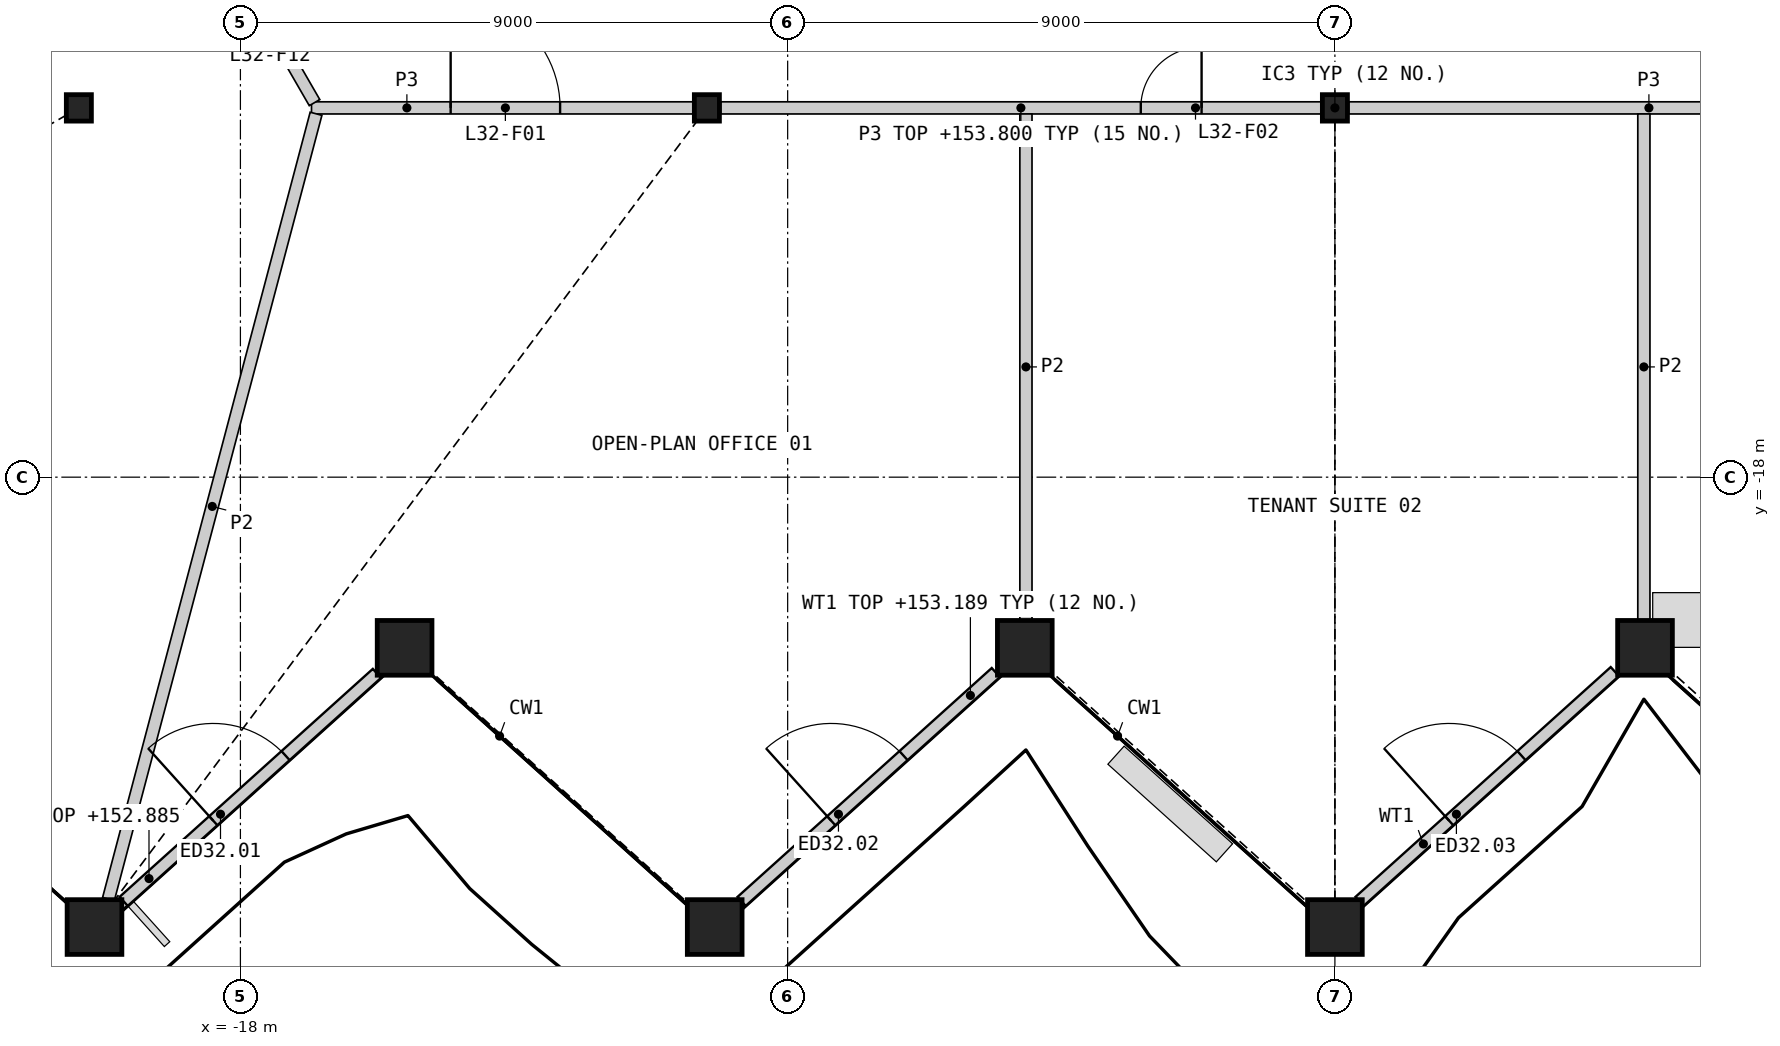
"""IFC4 building model, lengths in metres.
Left out: names, types, materials, properties, quantities, classifications, styles, units other than length and angle.
Written with IfcOpenShell. Run it as: python <this file> out.ifc"""

import sys

from ifc_helpers import new_model, si_unit, direction, frame, frame_2d, origin, origin_2d, place, context, subcontext, project, spatial, rectangle, hollow_rectangle, i_section, extrude, element, fill, save


model = new_model("IFC4")
c1 = context("Model", 3, precision=1e-05, world=origin(), true_north=direction((0.0, 1.0)))
c2 = subcontext(c1, "Body", "Model", "MODEL_VIEW")
j1 = project(units=[si_unit("LENGTHUNIT", "METRE"), si_unit("PLANEANGLEUNIT", "RADIAN")], contexts=[c1])
p1 = place(None, origin())
s1 = spatial("IfcSite", under=j1, at=p1, CompositionType="ELEMENT")
p2 = place(p1, origin())
s2 = spatial("IfcBuilding", under=s1, at=p2, CompositionType="ELEMENT")
p3 = place(p2, frame((0.0, 0.0, 150.0)))
s3 = spatial("IfcBuildingStorey", under=s2, at=p3, CompositionType="ELEMENT", Elevation=150.0)
for number, where, z_axis, x_axis in (
    (1, (-20.4, -25.399, 0.0), (0.0, 0.0, 1.0), (1.0, 0.0, 0.0)),
    (2, (-15.3, -20.807, 0.0), (0.0, 0.0, 1.0), (1.0, 0.0, 0.0)),
    (3, (-10.2, -25.399, 0.0), (0.0, 0.0, 1.0), (1.0, 0.0, 0.0)),
    (4, (-5.1, -20.807, 0.0), (0.0, 0.0, 1.0), (1.0, 0.0, 0.0)),
    (5, (0.0, -25.399, 0.0), (0.0, 0.0, 1.0), (1.0, 0.0, 0.0)),
    (6, (5.1, -20.807, 0.0), (0.0, 0.0, 1.0), (1.0, 0.0, 0.0)),
):
    element("IfcColumn", number, at=place(p3, frame(where, z_axis=z_axis, x_axis=x_axis)), inside=s3, PredefinedType="COLUMN", context=c2, shape_type="SweptSolid", body=[
        extrude(hollow_rectangle(XDim=0.9, YDim=0.9, WallThickness=0.06, at=origin_2d()), origin(), (0.0, 0.0, 1.0), 4.2),
    ])
for number, where, z_axis, x_axis in (
    (7, (-20.657, -11.926, 0.0), (0.0, 0.0, 1.0), (1.0, 0.0, 0.0)),
    (8, (-10.328, -11.926, 0.0), (0.0, 0.0, 1.0), (1.0, 0.0, 0.0)),
    (9, (0.0, -11.926, 0.0), (0.0, 0.0, 1.0), (1.0, 0.0, 0.0)),
):
    element("IfcColumn", number, at=place(p3, frame(where, z_axis=z_axis, x_axis=x_axis)), inside=s3, PredefinedType="COLUMN", context=c2, shape_type="SweptSolid", body=[
        extrude(i_section(OverallWidth=0.412, OverallDepth=0.435, WebThickness=0.036, FlangeThickness=0.057, at=origin_2d()), origin(), (0.0, 0.0, 1.0), 4.2),
    ])
p4 = place(p3, frame((-19.92, -24.977, 0.0), z_axis=(0.0, 0.0, 1.0), x_axis=(0.743146822591, 0.669128388333, 0.0)))
e10 = element("IfcWall", 10, at=p4, inside=s3, PredefinedType="SOLIDWALL", context=c2, shape_type="SweptSolid", body=[
    extrude(rectangle(XDim=5.604, YDim=0.2, at=frame_2d((2.802, 0.0))), origin(), (0.0, 0.0, 1.0), 2.885),
])
p5 = place(p4, frame((1.983, 0.0, 0.0)))
e11 = element("IfcOpeningElement", 11, at=p5, cuts=e10, PredefinedType="OPENING", context=c2, shape_type="SweptSolid", body=[
    extrude(rectangle(XDim=1.6, YDim=2.4, at=frame_2d((0.8, 1.2))), frame((0.0, 0.11, 0.0), z_axis=(0.0, -1.0, 0.0), x_axis=(1.0, 0.0, 0.0)), (0.0, 0.0, 1.0), 0.22),
])
p6 = place(p3, frame((-9.757, -24.977, 0.0), z_axis=(0.0, 0.0, 1.0), x_axis=(0.743158172546, 0.66911578264, 0.0)))
e12 = element("IfcWall", 12, at=p6, inside=s3, PredefinedType="SOLIDWALL", context=c2, shape_type="SweptSolid", body=[
    extrude(rectangle(XDim=5.625, YDim=0.2, at=frame_2d((2.812, 0.0))), origin(), (0.0, 0.0, 1.0), 3.189),
])
p7 = place(p6, frame((1.983, 0.0, 0.0)))
e13 = element("IfcOpeningElement", 13, at=p7, cuts=e12, PredefinedType="OPENING", context=c2, shape_type="SweptSolid", body=[
    extrude(rectangle(XDim=1.6, YDim=2.4, at=frame_2d((0.8, 1.2))), frame((0.0, 0.11, 0.0), z_axis=(0.0, -1.0, 0.0), x_axis=(1.0, 0.0, 0.0)), (0.0, 0.0, 1.0), 0.22),
])
p8 = place(p3, frame((0.406, -24.977, 0.0), z_axis=(0.0, 0.0, 1.0), x_axis=(0.743158726114, 0.669115167815, 0.0)))
e14 = element("IfcWall", 14, at=p8, inside=s3, PredefinedType="SOLIDWALL", context=c2, shape_type="SweptSolid", body=[
    extrude(rectangle(XDim=5.648, YDim=0.2, at=frame_2d((2.824, 0.0))), origin(), (0.0, 0.0, 1.0), 3.189),
])
p9 = place(p8, frame((1.983, 0.0, 0.0)))
e15 = element("IfcOpeningElement", 15, at=p9, cuts=e14, PredefinedType="OPENING", context=c2, shape_type="SweptSolid", body=[
    extrude(rectangle(XDim=1.6, YDim=2.4, at=frame_2d((0.8, 1.2))), frame((0.0, 0.11, 0.0), z_axis=(0.0, -1.0, 0.0), x_axis=(1.0, 0.0, 0.0)), (0.0, 0.0, 1.0), 0.22),
])
p10 = place(p3, frame((-10.101, -11.926, 0.0), z_axis=(0.0, 0.0, 1.0), x_axis=(1.0, 0.0, 0.0)))
e16 = element("IfcWall", 16, at=p10, inside=s3, PredefinedType="PARTITIONING", context=c2, shape_type="SweptSolid", body=[
    extrude(rectangle(XDim=9.874, YDim=0.2, at=frame_2d((4.937, 0.0))), origin(), (0.0, 0.0, 1.0), 3.8),
])
p11 = place(p10, frame((6.909, 0.0, 0.0)))
e17 = element("IfcOpeningElement", 17, at=p11, cuts=e16, PredefinedType="OPENING", context=c2, shape_type="SweptSolid", body=[
    extrude(rectangle(XDim=1.0, YDim=2.1, at=frame_2d((0.5, 1.05))), frame((0.0, 0.11, 0.0), z_axis=(0.0, -1.0, 0.0), x_axis=(1.0, 0.0, 0.0)), (0.0, 0.0, 1.0), 0.22),
])
p12 = place(p3, frame((0.227, -11.926, 0.0), z_axis=(0.0, 0.0, 1.0), x_axis=(1.0, 0.0, 0.0)))
e18 = element("IfcWall", 18, at=p12, inside=s3, PredefinedType="PARTITIONING", context=c2, shape_type="SweptSolid", body=[
    extrude(rectangle(XDim=9.874, YDim=0.2, at=frame_2d((4.937, 0.0))), origin(), (0.0, 0.0, 1.0), 3.8),
])
p13 = place(p3, frame((-16.831, -11.926, 0.0), z_axis=(0.0, 0.0, 1.0), x_axis=(1.0, 0.0, 0.0)))
e19 = element("IfcWall", 19, at=p13, inside=s3, PredefinedType="PARTITIONING", context=c2, shape_type="SweptSolid", body=[
    extrude(rectangle(XDim=6.275, YDim=0.2, at=frame_2d((3.137, 0.0))), origin(), (0.0, 0.0, 1.0), 3.8),
])
p14 = place(p13, frame((2.289, 0.0, 0.0)))
e20 = element("IfcOpeningElement", 20, at=p14, cuts=e19, PredefinedType="OPENING", context=c2, shape_type="SweptSolid", body=[
    extrude(rectangle(XDim=1.8, YDim=2.1, at=frame_2d((0.9, 1.05))), frame((0.0, 0.11, 0.0), z_axis=(0.0, -1.0, 0.0), x_axis=(1.0, 0.0, 0.0)), (0.0, 0.0, 1.0), 0.22),
])
p15 = place(p3, frame((-18.644, -8.613, 0.0), z_axis=(0.0, 0.0, 1.0), x_axis=(0.499958791762, -0.866049194065, 0.0)))
e21 = element("IfcWall", 21, at=p15, inside=s3, PredefinedType="PARTITIONING", context=c2, shape_type="SweptSolid", body=[
    extrude(rectangle(XDim=3.726, YDim=0.2, at=frame_2d((1.863, 0.0))), origin(), (0.0, 0.0, 1.0), 3.8),
])
p16 = place(p15, frame((1.363, 0.0, 0.0)))
e22 = element("IfcOpeningElement", 22, at=p16, cuts=e21, PredefinedType="OPENING", context=c2, shape_type="SweptSolid", body=[
    extrude(rectangle(XDim=1.0, YDim=2.1, at=frame_2d((0.5, 1.05))), frame((0.0, 0.11, 0.0), z_axis=(0.0, -1.0, 0.0), x_axis=(1.0, 0.0, 0.0)), (0.0, 0.0, 1.0), 0.22),
])
p17 = place(p3, frame((-20.17, -24.939, 0.0), z_axis=(0.0, 0.0, 1.0), x_axis=(0.25554647156, 0.966796773305, 0.0)))
e23 = element("IfcWall", 23, at=p17, inside=s3, PredefinedType="PARTITIONING", context=c2, shape_type="SweptSolid", body=[
    extrude(rectangle(XDim=13.36, YDim=0.2, at=frame_2d((6.68, 0.0))), origin(), (0.0, 0.0, 1.0), 2.885),
])
for number, where, z_axis, x_axis in (
    (24, (-5.081, -20.347, 0.0), (0.0, 0.0, 1.0), (0.0, 1.0, 0.0)),
    (25, (5.081, -20.347, 0.0), (0.0, 0.0, 1.0), (0.0, 1.0, 0.0)),
):
    element("IfcWall", number, at=place(p3, frame(where, z_axis=z_axis, x_axis=x_axis)), inside=s3, PredefinedType="PARTITIONING", context=c2, shape_type="SweptSolid", body=[
        extrude(rectangle(XDim=8.321, YDim=0.2, at=frame_2d((4.16, 0.0))), origin(), (0.0, 0.0, 1.0), 2.885),
    ])
p18 = place(p5, origin())
e26 = element("IfcDoor", 26, at=p18, inside=s3, OperationType="DOUBLE_DOOR_SINGLE_SWING", PredefinedType="DOOR", context=c2, shape_type="SweptSolid", body=[
    extrude(rectangle(XDim=1.6, YDim=2.4, at=frame_2d((0.8, 1.2))), frame((0.0, 0.025, 0.0), z_axis=(0.0, -1.0, 0.0), x_axis=(1.0, 0.0, 0.0)), (0.0, 0.0, 1.0), 0.05),
])
fill(e11, e26)
p19 = place(p7, origin())
e27 = element("IfcDoor", 27, at=p19, inside=s3, OperationType="DOUBLE_DOOR_SINGLE_SWING", PredefinedType="DOOR", context=c2, shape_type="SweptSolid", body=[
    extrude(rectangle(XDim=1.6, YDim=2.4, at=frame_2d((0.8, 1.2))), frame((0.0, 0.025, 0.0), z_axis=(0.0, -1.0, 0.0), x_axis=(1.0, 0.0, 0.0)), (0.0, 0.0, 1.0), 0.05),
])
fill(e13, e27)
p20 = place(p9, origin())
e28 = element("IfcDoor", 28, at=p20, inside=s3, OperationType="DOUBLE_DOOR_SINGLE_SWING", PredefinedType="DOOR", context=c2, shape_type="SweptSolid", body=[
    extrude(rectangle(XDim=1.6, YDim=2.4, at=frame_2d((0.8, 1.2))), frame((0.0, 0.025, 0.0), z_axis=(0.0, -1.0, 0.0), x_axis=(1.0, 0.0, 0.0)), (0.0, 0.0, 1.0), 0.05),
])
fill(e15, e28)
p21 = place(p14, origin())
e29 = element("IfcDoor", 29, at=p21, inside=s3, OperationType="DOUBLE_DOOR_SINGLE_SWING", PredefinedType="DOOR", context=c2, shape_type="SweptSolid", body=[
    extrude(rectangle(XDim=1.8, YDim=2.1, at=frame_2d((0.9, 1.05))), frame((0.0, 0.025, 0.0), z_axis=(0.0, -1.0, 0.0), x_axis=(1.0, 0.0, 0.0)), (0.0, 0.0, 1.0), 0.05),
])
fill(e20, e29)
p22 = place(p11, origin())
e30 = element("IfcDoor", 30, at=p22, inside=s3, OperationType="SINGLE_SWING_RIGHT", PredefinedType="DOOR", context=c2, shape_type="SweptSolid", body=[
    extrude(rectangle(XDim=1.0, YDim=2.1, at=frame_2d((0.5, 1.05))), frame((0.0, 0.025, 0.0), z_axis=(0.0, -1.0, 0.0), x_axis=(1.0, 0.0, 0.0)), (0.0, 0.0, 1.0), 0.05),
])
fill(e17, e30)
save(model, sys.argv[1])
